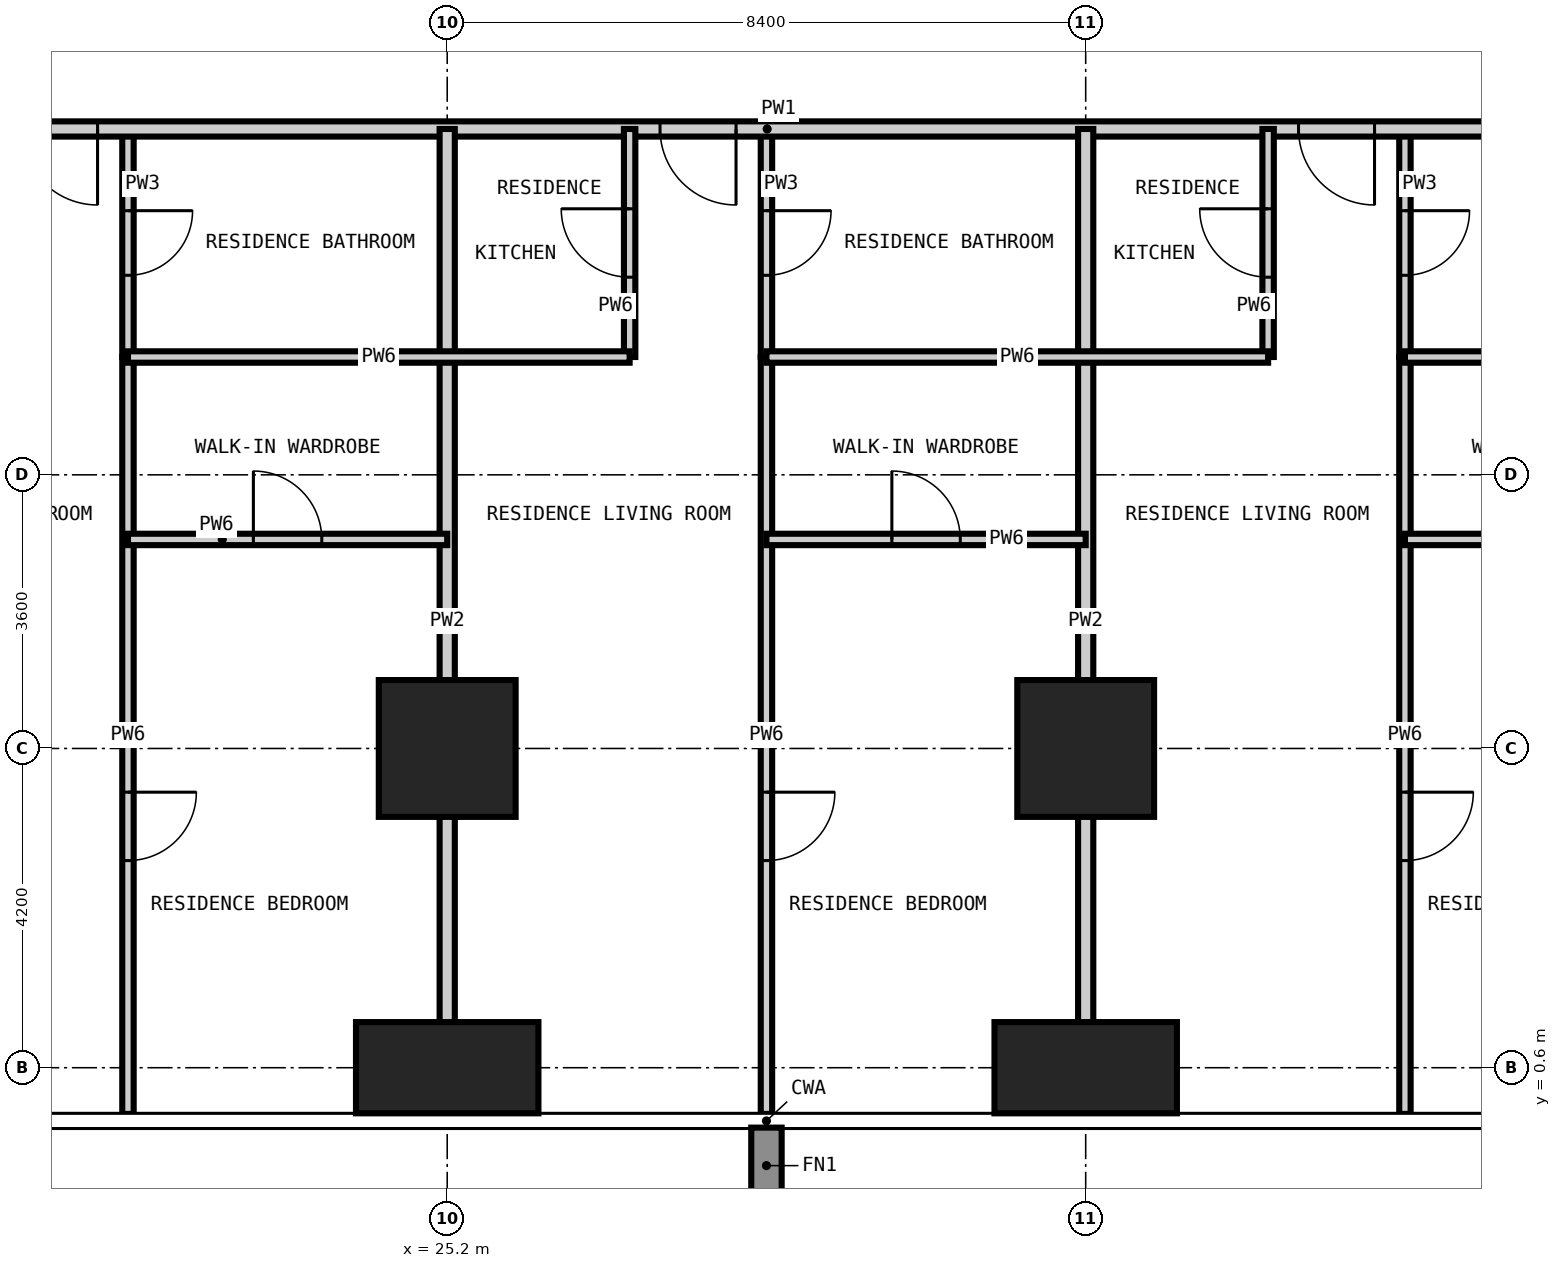
"""IFC4 building model, lengths in metres.
Left out: names, types, materials, properties, quantities, classifications, styles, units other than length and angle.
Written with IfcOpenShell. Run it as: python <this file> out.ifc"""

import sys

from ifc_helpers import new_model, si_unit, direction, frame, frame_2d, origin, origin_2d, place, context, subcontext, project, spatial, rectangle, extrude, element, fill, save


model = new_model("IFC4")
c1 = context("Model", 3, precision=1e-05, world=origin(), true_north=direction((0.0, 1.0)))
c2 = subcontext(c1, "Body", "Model", "MODEL_VIEW")
j1 = project(units=[si_unit("LENGTHUNIT", "METRE"), si_unit("PLANEANGLEUNIT", "RADIAN")], contexts=[c1])
p1 = place(None, origin())
s1 = spatial("IfcSite", under=j1, at=p1, CompositionType="ELEMENT")
p2 = place(p1, origin())
s2 = spatial("IfcBuilding", under=s1, at=p2, CompositionType="ELEMENT")
p3 = place(p2, frame((0.0, 0.0, 45.0)))
s3 = spatial("IfcBuildingStorey", under=s2, at=p3, CompositionType="ELEMENT", Elevation=45.0)
p4 = place(p3, frame((25.2, 0.6, -0.35), z_axis=(0.0, 0.0, 1.0), x_axis=(1.0, 0.0, 0.0)))
e1 = element("IfcColumn", 1, at=p4, inside=s3, PredefinedType="COLUMN", context=c2, shape_type="SweptSolid", body=[
    extrude(rectangle(XDim=2.4, YDim=1.2, at=origin_2d()), origin(), (0.0, 0.0, 1.0), 3.6),
])
p5 = place(p3, frame((25.2, 4.8, -0.35), z_axis=(0.0, 0.0, 1.0), x_axis=(1.0, 0.0, 0.0)))
e2 = element("IfcColumn", 2, at=p5, inside=s3, PredefinedType="COLUMN", context=c2, shape_type="SweptSolid", body=[
    extrude(rectangle(XDim=1.8, YDim=1.8, at=origin_2d()), origin(), (0.0, 0.0, 1.0), 3.6),
])
p6 = place(p3, frame((33.6, 0.6, -0.35), z_axis=(0.0, 0.0, 1.0), x_axis=(1.0, 0.0, 0.0)))
e3 = element("IfcColumn", 3, at=p6, inside=s3, PredefinedType="COLUMN", context=c2, shape_type="SweptSolid", body=[
    extrude(rectangle(XDim=2.4, YDim=1.2, at=origin_2d()), origin(), (0.0, 0.0, 1.0), 3.6),
])
p7 = place(p3, frame((33.6, 4.8, -0.35), z_axis=(0.0, 0.0, 1.0), x_axis=(1.0, 0.0, 0.0)))
e4 = element("IfcColumn", 4, at=p7, inside=s3, PredefinedType="COLUMN", context=c2, shape_type="SweptSolid", body=[
    extrude(rectangle(XDim=1.8, YDim=1.8, at=origin_2d()), origin(), (0.0, 0.0, 1.0), 3.6),
])
p8 = place(p3, frame((21.0, 9.95, 0.0), z_axis=(0.0, 0.0, 1.0), x_axis=(0.0, 1.0, 0.0)))
e5 = element("IfcWall", 5, at=p8, inside=s3, PredefinedType="PARTITIONING", context=c2, shape_type="SweptSolid", body=[
    extrude(rectangle(XDim=3.0, YDim=0.15, at=frame_2d((1.5, 0.0))), origin(), (0.0, 0.0, 1.0), 3.25),
])
p9 = place(p8, frame((1.075, 0.0, 0.0)))
e6 = element("IfcOpeningElement", 6, at=p9, cuts=e5, PredefinedType="OPENING", context=c2, shape_type="SweptSolid", body=[
    extrude(rectangle(XDim=0.85, YDim=2.1, at=frame_2d((0.425, 1.05))), frame((0.0, 0.085, 0.0), z_axis=(0.0, -1.0, 0.0), x_axis=(1.0, 0.0, 0.0)), (0.0, 0.0, 1.0), 0.17),
])
p10 = place(p3, frame((29.4, 9.95, 0.0), z_axis=(0.0, 0.0, 1.0), x_axis=(0.0, 1.0, 0.0)))
e7 = element("IfcWall", 7, at=p10, inside=s3, PredefinedType="PARTITIONING", context=c2, shape_type="SweptSolid", body=[
    extrude(rectangle(XDim=3.0, YDim=0.15, at=frame_2d((1.5, 0.0))), origin(), (0.0, 0.0, 1.0), 3.25),
])
p11 = place(p10, frame((1.075, 0.0, 0.0)))
e8 = element("IfcOpeningElement", 8, at=p11, cuts=e7, PredefinedType="OPENING", context=c2, shape_type="SweptSolid", body=[
    extrude(rectangle(XDim=0.85, YDim=2.1, at=frame_2d((0.425, 1.05))), frame((0.0, 0.085, 0.0), z_axis=(0.0, -1.0, 0.0), x_axis=(1.0, 0.0, 0.0)), (0.0, 0.0, 1.0), 0.17),
])
p12 = place(p3, frame((37.8, 9.95, 0.0), z_axis=(0.0, 0.0, 1.0), x_axis=(0.0, 1.0, 0.0)))
e9 = element("IfcWall", 9, at=p12, inside=s3, PredefinedType="PARTITIONING", context=c2, shape_type="SweptSolid", body=[
    extrude(rectangle(XDim=3.0, YDim=0.15, at=frame_2d((1.5, 0.0))), origin(), (0.0, 0.0, 1.0), 3.25),
])
p13 = place(p12, frame((1.075, 0.0, 0.0)))
e10 = element("IfcOpeningElement", 10, at=p13, cuts=e9, PredefinedType="OPENING", context=c2, shape_type="SweptSolid", body=[
    extrude(rectangle(XDim=0.85, YDim=2.1, at=frame_2d((0.425, 1.05))), frame((0.0, 0.085, 0.0), z_axis=(0.0, -1.0, 0.0), x_axis=(1.0, 0.0, 0.0)), (0.0, 0.0, 1.0), 0.17),
])
p14 = place(p3, frame((45.25, 12.95, 0.0), z_axis=(0.0, 0.0, 1.0), x_axis=(-1.0, 0.0, 0.0)))
e11 = element("IfcWall", 11, at=p14, inside=s3, PredefinedType="PARTITIONING", context=c2, shape_type="SweptSolid", body=[
    extrude(rectangle(XDim=32.3, YDim=0.2, at=frame_2d((16.15, 0.0))), origin(), (0.0, 0.0, 1.0), 3.25),
])
p15 = place(p14, frame((24.65, 0.0, 0.0)))
e12 = element("IfcOpeningElement", 12, at=p15, cuts=e11, PredefinedType="OPENING", context=c2, shape_type="SweptSolid", body=[
    extrude(rectangle(XDim=1.0, YDim=2.2, at=frame_2d((0.5, 1.1))), frame((0.0, 0.11, 0.0), z_axis=(0.0, -1.0, 0.0), x_axis=(1.0, 0.0, 0.0)), (0.0, 0.0, 1.0), 0.22),
])
p16 = place(p14, frame((16.25, 0.0, 0.0)))
e13 = element("IfcOpeningElement", 13, at=p16, cuts=e11, PredefinedType="OPENING", context=c2, shape_type="SweptSolid", body=[
    extrude(rectangle(XDim=1.0, YDim=2.2, at=frame_2d((0.5, 1.1))), frame((0.0, 0.11, 0.0), z_axis=(0.0, -1.0, 0.0), x_axis=(1.0, 0.0, 0.0)), (0.0, 0.0, 1.0), 0.22),
])
p17 = place(p14, frame((7.85, 0.0, 0.0)))
e14 = element("IfcOpeningElement", 14, at=p17, cuts=e11, PredefinedType="OPENING", context=c2, shape_type="SweptSolid", body=[
    extrude(rectangle(XDim=1.0, YDim=2.2, at=frame_2d((0.5, 1.1))), frame((0.0, 0.11, 0.0), z_axis=(0.0, -1.0, 0.0), x_axis=(1.0, 0.0, 0.0)), (0.0, 0.0, 1.0), 0.22),
])
for number, where, z_axis, x_axis in (
    (15, (25.2, -0.008, 0.0), (0.0, 0.0, 1.0), (0.0, 1.0, 0.0)),
    (16, (33.6, -0.008, 0.0), (0.0, 0.0, 1.0), (0.0, 1.0, 0.0)),
):
    element("IfcWall", number, at=place(p3, frame(where, z_axis=z_axis, x_axis=x_axis)), inside=s3, PredefinedType="PARTITIONING", context=c2, shape_type="SweptSolid", body=[
        extrude(rectangle(XDim=12.958, YDim=0.2, at=frame_2d((6.479, 0.0))), origin(), (0.0, 0.0, 1.0), 3.25),
    ])
p18 = place(p3, frame((21.0, -0.008, 0.0), z_axis=(0.0, 0.0, 1.0), x_axis=(0.0, 1.0, 0.0)))
e17 = element("IfcWall", 17, at=p18, inside=s3, PredefinedType="PARTITIONING", context=c2, shape_type="SweptSolid", body=[
    extrude(rectangle(XDim=9.958, YDim=0.15, at=frame_2d((4.979, 0.0))), origin(), (0.0, 0.0, 1.0), 3.25),
])
p19 = place(p18, frame((3.333, 0.0, 0.0)))
e18 = element("IfcOpeningElement", 18, at=p19, cuts=e17, PredefinedType="OPENING", context=c2, shape_type="SweptSolid", body=[
    extrude(rectangle(XDim=0.9, YDim=2.1, at=frame_2d((0.45, 1.05))), frame((0.0, 0.085, 0.0), z_axis=(0.0, -1.0, 0.0), x_axis=(1.0, 0.0, 0.0)), (0.0, 0.0, 1.0), 0.17),
])
p20 = place(p3, frame((27.6, 9.95, 0.0), z_axis=(0.0, 0.0, 1.0), x_axis=(0.0, 1.0, 0.0)))
e19 = element("IfcWall", 19, at=p20, inside=s3, PredefinedType="PARTITIONING", context=c2, shape_type="SweptSolid", body=[
    extrude(rectangle(XDim=3.0, YDim=0.15, at=frame_2d((1.5, 0.0))), origin(), (0.0, 0.0, 1.0), 3.25),
])
p21 = place(p20, frame((1.05, 0.0, 0.0)))
e20 = element("IfcOpeningElement", 20, at=p21, cuts=e19, PredefinedType="OPENING", context=c2, shape_type="SweptSolid", body=[
    extrude(rectangle(XDim=0.9, YDim=2.1, at=frame_2d((0.45, 1.05))), frame((0.0, 0.085, 0.0), z_axis=(0.0, -1.0, 0.0), x_axis=(1.0, 0.0, 0.0)), (0.0, 0.0, 1.0), 0.17),
])
p22 = place(p3, frame((29.4, -0.008, 0.0), z_axis=(0.0, 0.0, 1.0), x_axis=(0.0, 1.0, 0.0)))
e21 = element("IfcWall", 21, at=p22, inside=s3, PredefinedType="PARTITIONING", context=c2, shape_type="SweptSolid", body=[
    extrude(rectangle(XDim=9.958, YDim=0.15, at=frame_2d((4.979, 0.0))), origin(), (0.0, 0.0, 1.0), 3.25),
])
p23 = place(p22, frame((3.333, 0.0, 0.0)))
e22 = element("IfcOpeningElement", 22, at=p23, cuts=e21, PredefinedType="OPENING", context=c2, shape_type="SweptSolid", body=[
    extrude(rectangle(XDim=0.9, YDim=2.1, at=frame_2d((0.45, 1.05))), frame((0.0, 0.085, 0.0), z_axis=(0.0, -1.0, 0.0), x_axis=(1.0, 0.0, 0.0)), (0.0, 0.0, 1.0), 0.17),
])
p24 = place(p3, frame((36.0, 9.95, 0.0), z_axis=(0.0, 0.0, 1.0), x_axis=(0.0, 1.0, 0.0)))
e23 = element("IfcWall", 23, at=p24, inside=s3, PredefinedType="PARTITIONING", context=c2, shape_type="SweptSolid", body=[
    extrude(rectangle(XDim=3.0, YDim=0.15, at=frame_2d((1.5, 0.0))), origin(), (0.0, 0.0, 1.0), 3.25),
])
p25 = place(p24, frame((1.05, 0.0, 0.0)))
e24 = element("IfcOpeningElement", 24, at=p25, cuts=e23, PredefinedType="OPENING", context=c2, shape_type="SweptSolid", body=[
    extrude(rectangle(XDim=0.9, YDim=2.1, at=frame_2d((0.45, 1.05))), frame((0.0, 0.085, 0.0), z_axis=(0.0, -1.0, 0.0), x_axis=(1.0, 0.0, 0.0)), (0.0, 0.0, 1.0), 0.17),
])
p26 = place(p3, frame((37.8, -0.008, 0.0), z_axis=(0.0, 0.0, 1.0), x_axis=(0.0, 1.0, 0.0)))
e25 = element("IfcWall", 25, at=p26, inside=s3, PredefinedType="PARTITIONING", context=c2, shape_type="SweptSolid", body=[
    extrude(rectangle(XDim=9.958, YDim=0.15, at=frame_2d((4.979, 0.0))), origin(), (0.0, 0.0, 1.0), 3.25),
])
p27 = place(p26, frame((3.333, 0.0, 0.0)))
e26 = element("IfcOpeningElement", 26, at=p27, cuts=e25, PredefinedType="OPENING", context=c2, shape_type="SweptSolid", body=[
    extrude(rectangle(XDim=0.9, YDim=2.1, at=frame_2d((0.45, 1.05))), frame((0.0, 0.085, 0.0), z_axis=(0.0, -1.0, 0.0), x_axis=(1.0, 0.0, 0.0)), (0.0, 0.0, 1.0), 0.17),
])
p28 = place(p3, frame((21.0, 7.55, 0.0), z_axis=(0.0, 0.0, 1.0), x_axis=(1.0, 0.0, 0.0)))
e27 = element("IfcWall", 27, at=p28, inside=s3, PredefinedType="PARTITIONING", context=c2, shape_type="SweptSolid", body=[
    extrude(rectangle(XDim=4.2, YDim=0.15, at=frame_2d((2.1, 0.0))), origin(), (0.0, 0.0, 1.0), 3.25),
])
p29 = place(p28, frame((1.65, 0.0, 0.0)))
e28 = element("IfcOpeningElement", 28, at=p29, cuts=e27, PredefinedType="OPENING", context=c2, shape_type="SweptSolid", body=[
    extrude(rectangle(XDim=0.9, YDim=2.1, at=frame_2d((0.45, 1.05))), frame((0.0, 0.085, 0.0), z_axis=(0.0, -1.0, 0.0), x_axis=(1.0, 0.0, 0.0)), (0.0, 0.0, 1.0), 0.17),
])
p30 = place(p3, frame((29.4, 7.55, 0.0), z_axis=(0.0, 0.0, 1.0), x_axis=(1.0, 0.0, 0.0)))
e29 = element("IfcWall", 29, at=p30, inside=s3, PredefinedType="PARTITIONING", context=c2, shape_type="SweptSolid", body=[
    extrude(rectangle(XDim=4.2, YDim=0.15, at=frame_2d((2.1, 0.0))), origin(), (0.0, 0.0, 1.0), 3.25),
])
p31 = place(p30, frame((1.65, 0.0, 0.0)))
e30 = element("IfcOpeningElement", 30, at=p31, cuts=e29, PredefinedType="OPENING", context=c2, shape_type="SweptSolid", body=[
    extrude(rectangle(XDim=0.9, YDim=2.1, at=frame_2d((0.45, 1.05))), frame((0.0, 0.085, 0.0), z_axis=(0.0, -1.0, 0.0), x_axis=(1.0, 0.0, 0.0)), (0.0, 0.0, 1.0), 0.17),
])
p32 = place(p3, frame((37.8, 7.55, 0.0), z_axis=(0.0, 0.0, 1.0), x_axis=(1.0, 0.0, 0.0)))
e31 = element("IfcWall", 31, at=p32, inside=s3, PredefinedType="PARTITIONING", context=c2, shape_type="SweptSolid", body=[
    extrude(rectangle(XDim=4.2, YDim=0.15, at=frame_2d((2.1, 0.0))), origin(), (0.0, 0.0, 1.0), 3.25),
])
p33 = place(p32, frame((1.65, 0.0, 0.0)))
e32 = element("IfcOpeningElement", 32, at=p33, cuts=e31, PredefinedType="OPENING", context=c2, shape_type="SweptSolid", body=[
    extrude(rectangle(XDim=0.9, YDim=2.1, at=frame_2d((0.45, 1.05))), frame((0.0, 0.085, 0.0), z_axis=(0.0, -1.0, 0.0), x_axis=(1.0, 0.0, 0.0)), (0.0, 0.0, 1.0), 0.17),
])
for number, where, z_axis, x_axis in (
    (33, (21.0, 9.95, 0.0), (0.0, 0.0, 1.0), (1.0, 0.0, 0.0)),
    (34, (29.4, 9.95, 0.0), (0.0, 0.0, 1.0), (1.0, 0.0, 0.0)),
):
    element("IfcWall", number, at=place(p3, frame(where, z_axis=z_axis, x_axis=x_axis)), inside=s3, PredefinedType="PARTITIONING", context=c2, shape_type="SweptSolid", body=[
        extrude(rectangle(XDim=6.6, YDim=0.15, at=frame_2d((3.3, 0.0))), origin(), (0.0, 0.0, 1.0), 3.25),
    ])
p34 = place(p3, frame((37.8, 9.95, 0.0), z_axis=(0.0, 0.0, 1.0), x_axis=(1.0, 0.0, 0.0)))
e35 = element("IfcWall", 35, at=p34, inside=s3, PredefinedType="PARTITIONING", context=c2, shape_type="SweptSolid", body=[
    extrude(rectangle(XDim=4.2, YDim=0.15, at=frame_2d((2.1, 0.0))), origin(), (0.0, 0.0, 1.0), 3.25),
])
p35 = place(p15, origin())
e36 = element("IfcDoor", 36, at=p35, inside=s3, OperationType="SINGLE_SWING_LEFT", PredefinedType="DOOR", context=c2, shape_type="SweptSolid", body=[
    extrude(rectangle(XDim=1.0, YDim=2.2, at=frame_2d((0.5, 1.1))), frame((0.0, 0.025, 0.0), z_axis=(0.0, -1.0, 0.0), x_axis=(1.0, 0.0, 0.0)), (0.0, 0.0, 1.0), 0.05),
])
fill(e12, e36)
p36 = place(p9, frame((0.85, 0.0, 0.0), z_axis=(0.0, 0.0, 1.0), x_axis=(-1.0, 0.0, 0.0)))
e37 = element("IfcDoor", 37, at=p36, inside=s3, OperationType="SINGLE_SWING_LEFT", PredefinedType="DOOR", context=c2, shape_type="SweptSolid", body=[
    extrude(rectangle(XDim=0.85, YDim=2.1, at=frame_2d((0.425, 1.05))), frame((0.0, 0.025, 0.0), z_axis=(0.0, -1.0, 0.0), x_axis=(1.0, 0.0, 0.0)), (0.0, 0.0, 1.0), 0.05),
])
fill(e6, e37)
p37 = place(p29, origin())
e38 = element("IfcDoor", 38, at=p37, inside=s3, OperationType="SINGLE_SWING_LEFT", PredefinedType="DOOR", context=c2, shape_type="SweptSolid", body=[
    extrude(rectangle(XDim=0.9, YDim=2.1, at=frame_2d((0.45, 1.05))), frame((0.0, 0.025, 0.0), z_axis=(0.0, -1.0, 0.0), x_axis=(1.0, 0.0, 0.0)), (0.0, 0.0, 1.0), 0.05),
])
fill(e28, e38)
p38 = place(p19, frame((0.9, 0.0, 0.0), z_axis=(0.0, 0.0, 1.0), x_axis=(-1.0, 0.0, 0.0)))
e39 = element("IfcDoor", 39, at=p38, inside=s3, OperationType="SINGLE_SWING_LEFT", PredefinedType="DOOR", context=c2, shape_type="SweptSolid", body=[
    extrude(rectangle(XDim=0.9, YDim=2.1, at=frame_2d((0.45, 1.05))), frame((0.0, 0.025, 0.0), z_axis=(0.0, -1.0, 0.0), x_axis=(1.0, 0.0, 0.0)), (0.0, 0.0, 1.0), 0.05),
])
fill(e18, e39)
p39 = place(p16, origin())
e40 = element("IfcDoor", 40, at=p39, inside=s3, OperationType="SINGLE_SWING_LEFT", PredefinedType="DOOR", context=c2, shape_type="SweptSolid", body=[
    extrude(rectangle(XDim=1.0, YDim=2.2, at=frame_2d((0.5, 1.1))), frame((0.0, 0.025, 0.0), z_axis=(0.0, -1.0, 0.0), x_axis=(1.0, 0.0, 0.0)), (0.0, 0.0, 1.0), 0.05),
])
fill(e13, e40)
p40 = place(p21, origin())
e41 = element("IfcDoor", 41, at=p40, inside=s3, OperationType="SINGLE_SWING_RIGHT", PredefinedType="DOOR", context=c2, shape_type="SweptSolid", body=[
    extrude(rectangle(XDim=0.9, YDim=2.1, at=frame_2d((0.45, 1.05))), frame((0.0, 0.025, 0.0), z_axis=(0.0, -1.0, 0.0), x_axis=(1.0, 0.0, 0.0)), (0.0, 0.0, 1.0), 0.05),
])
fill(e20, e41)
p41 = place(p11, frame((0.85, 0.0, 0.0), z_axis=(0.0, 0.0, 1.0), x_axis=(-1.0, 0.0, 0.0)))
e42 = element("IfcDoor", 42, at=p41, inside=s3, OperationType="SINGLE_SWING_LEFT", PredefinedType="DOOR", context=c2, shape_type="SweptSolid", body=[
    extrude(rectangle(XDim=0.85, YDim=2.1, at=frame_2d((0.425, 1.05))), frame((0.0, 0.025, 0.0), z_axis=(0.0, -1.0, 0.0), x_axis=(1.0, 0.0, 0.0)), (0.0, 0.0, 1.0), 0.05),
])
fill(e8, e42)
p42 = place(p31, origin())
e43 = element("IfcDoor", 43, at=p42, inside=s3, OperationType="SINGLE_SWING_LEFT", PredefinedType="DOOR", context=c2, shape_type="SweptSolid", body=[
    extrude(rectangle(XDim=0.9, YDim=2.1, at=frame_2d((0.45, 1.05))), frame((0.0, 0.025, 0.0), z_axis=(0.0, -1.0, 0.0), x_axis=(1.0, 0.0, 0.0)), (0.0, 0.0, 1.0), 0.05),
])
fill(e30, e43)
p43 = place(p23, frame((0.9, 0.0, 0.0), z_axis=(0.0, 0.0, 1.0), x_axis=(-1.0, 0.0, 0.0)))
e44 = element("IfcDoor", 44, at=p43, inside=s3, OperationType="SINGLE_SWING_LEFT", PredefinedType="DOOR", context=c2, shape_type="SweptSolid", body=[
    extrude(rectangle(XDim=0.9, YDim=2.1, at=frame_2d((0.45, 1.05))), frame((0.0, 0.025, 0.0), z_axis=(0.0, -1.0, 0.0), x_axis=(1.0, 0.0, 0.0)), (0.0, 0.0, 1.0), 0.05),
])
fill(e22, e44)
p44 = place(p17, origin())
e45 = element("IfcDoor", 45, at=p44, inside=s3, OperationType="SINGLE_SWING_LEFT", PredefinedType="DOOR", context=c2, shape_type="SweptSolid", body=[
    extrude(rectangle(XDim=1.0, YDim=2.2, at=frame_2d((0.5, 1.1))), frame((0.0, 0.025, 0.0), z_axis=(0.0, -1.0, 0.0), x_axis=(1.0, 0.0, 0.0)), (0.0, 0.0, 1.0), 0.05),
])
fill(e14, e45)
p45 = place(p25, origin())
e46 = element("IfcDoor", 46, at=p45, inside=s3, OperationType="SINGLE_SWING_RIGHT", PredefinedType="DOOR", context=c2, shape_type="SweptSolid", body=[
    extrude(rectangle(XDim=0.9, YDim=2.1, at=frame_2d((0.45, 1.05))), frame((0.0, 0.025, 0.0), z_axis=(0.0, -1.0, 0.0), x_axis=(1.0, 0.0, 0.0)), (0.0, 0.0, 1.0), 0.05),
])
fill(e24, e46)
p46 = place(p13, frame((0.85, 0.0, 0.0), z_axis=(0.0, 0.0, 1.0), x_axis=(-1.0, 0.0, 0.0)))
e47 = element("IfcDoor", 47, at=p46, inside=s3, OperationType="SINGLE_SWING_LEFT", PredefinedType="DOOR", context=c2, shape_type="SweptSolid", body=[
    extrude(rectangle(XDim=0.85, YDim=2.1, at=frame_2d((0.425, 1.05))), frame((0.0, 0.025, 0.0), z_axis=(0.0, -1.0, 0.0), x_axis=(1.0, 0.0, 0.0)), (0.0, 0.0, 1.0), 0.05),
])
fill(e10, e47)
p47 = place(p27, frame((0.9, 0.0, 0.0), z_axis=(0.0, 0.0, 1.0), x_axis=(-1.0, 0.0, 0.0)))
e48 = element("IfcDoor", 48, at=p47, inside=s3, OperationType="SINGLE_SWING_LEFT", PredefinedType="DOOR", context=c2, shape_type="SweptSolid", body=[
    extrude(rectangle(XDim=0.9, YDim=2.1, at=frame_2d((0.45, 1.05))), frame((0.0, 0.025, 0.0), z_axis=(0.0, -1.0, 0.0), x_axis=(1.0, 0.0, 0.0)), (0.0, 0.0, 1.0), 0.05),
])
fill(e26, e48)
save(model, sys.argv[1])
